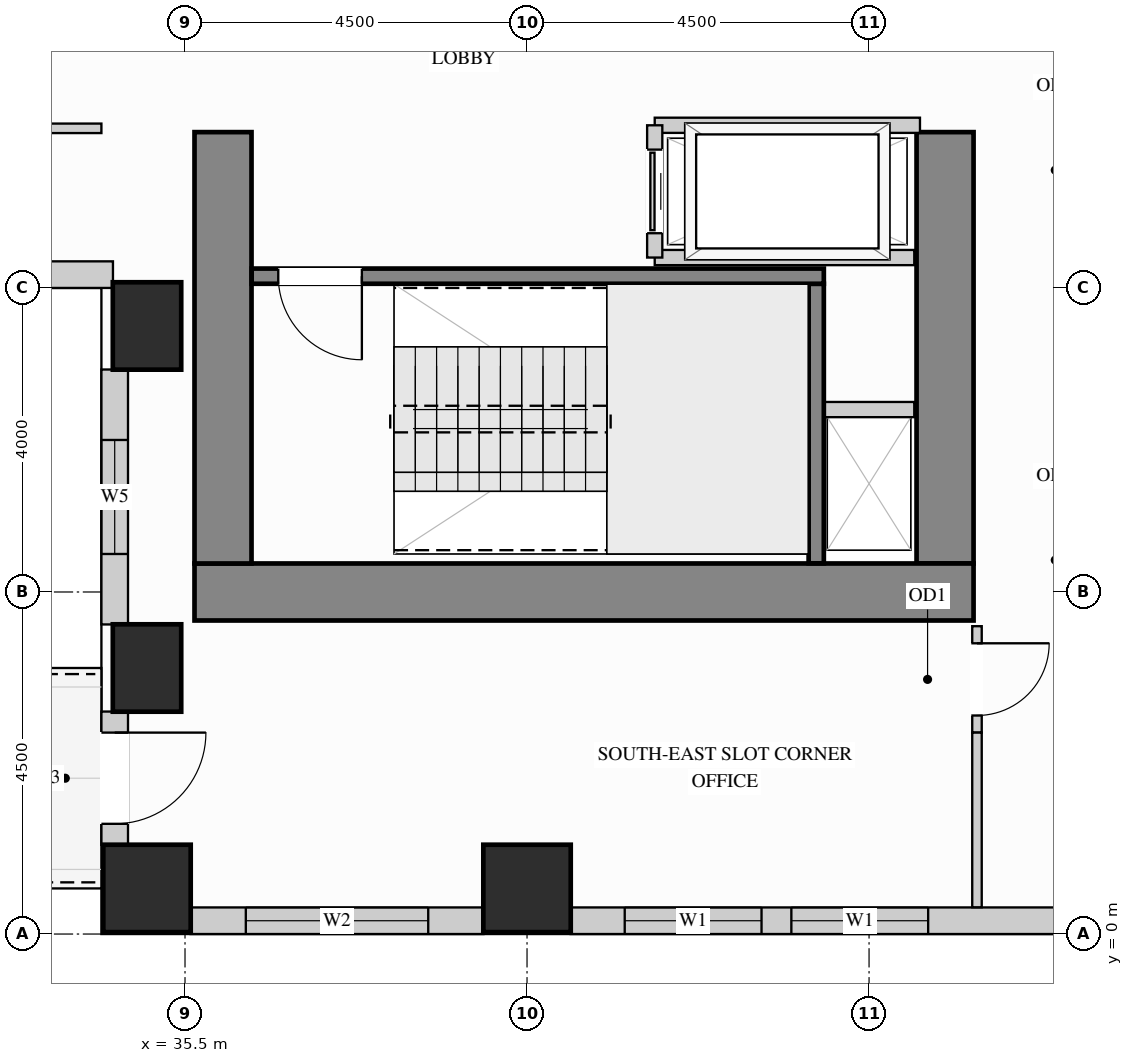
"""IFC4 building model, lengths in metres.
Left out: names, types, materials, properties, quantities, classifications, styles, units other than length and angle.
Written with IfcOpenShell. Run it as: python <this file> out.ifc"""

import sys

from ifc_helpers import new_model, si_unit, direction, frame, frame_2d, origin, origin_2d, place, context, subcontext, project, spatial, rectangle, extrude, source, transform, mapped, element, fill, save


model = new_model("IFC4")
c1 = context("Model", 3, precision=1e-05, world=origin(), true_north=direction((0.0, 1.0)))
c2 = subcontext(c1, "Body", "Model", "MODEL_VIEW")
j1 = project(units=[si_unit("LENGTHUNIT", "METRE"), si_unit("PLANEANGLEUNIT", "RADIAN")], contexts=[c1])
p1 = place(None, origin())
s1 = spatial("IfcSite", under=j1, at=p1, CompositionType="ELEMENT")
p2 = place(p1, origin())
s2 = spatial("IfcBuilding", under=s1, at=p2, CompositionType="ELEMENT")
p3 = place(p2, frame((0.0, 0.0, 135.0)))
s3 = spatial("IfcBuildingStorey", under=s2, at=p3, CompositionType="ELEMENT", Elevation=135.0)
m1 = source(origin(), c2, "Body", "SweptSolid", [
    extrude(rectangle(XDim=0.9, YDim=1.15, at=origin_2d()), origin(), (0.0, 0.0, 1.0), 3.32),
])
for number, where, z_axis, x_axis in (
    (1, (35.0, 3.5, 0.0), (0.0, 0.0, 1.0), (1.0, 0.0, 0.0)),
    (2, (35.0, 8.0, 0.0), (0.0, 0.0, 1.0), (1.0, 0.0, 0.0)),
):
    element("IfcColumn", number, at=place(p3, frame(where, z_axis=z_axis, x_axis=x_axis)), inside=s3, PredefinedType="COLUMN", context=c2, shape_type="MappedRepresentation", body=[
        mapped(m1, transform((0.0, 0.0, 0.0), x_axis=(1.0, 0.0, 0.0), y_axis=(0.0, 1.0, 0.0), z_axis=(0.0, 0.0, 1.0))),
    ])
m2 = source(origin(), c2, "Body", "SweptSolid", [
    extrude(rectangle(XDim=1.15, YDim=1.15, at=origin_2d()), origin(), (0.0, 0.0, 1.0), 3.32),
])
for number, where, z_axis, x_axis in (
    (3, (35.0, 0.6, 0.0), (0.0, 0.0, 1.0), (1.0, 0.0, 0.0)),
    (4, (40.0, 0.6, 0.0), (0.0, 0.0, 1.0), (1.0, 0.0, 0.0)),
):
    element("IfcColumn", number, at=place(p3, frame(where, z_axis=z_axis, x_axis=x_axis)), inside=s3, PredefinedType="COLUMN", context=c2, shape_type="MappedRepresentation", body=[
        mapped(m2, transform((0.0, 0.0, 0.0), x_axis=(1.0, 0.0, 0.0), y_axis=(0.0, 1.0, 0.0), z_axis=(0.0, 0.0, 1.0))),
    ])
m3 = source(origin(), c2, "Body", "SweptSolid", [
    extrude(rectangle(XDim=5.675, YDim=0.75, at=frame_2d((2.837, 0.0))), origin(), (0.0, 0.0, 1.0), 3.32),
])
p4 = place(p3, frame((45.5, 4.875, 0.0), z_axis=(0.0, 0.0, 1.0), x_axis=(0.0, 1.0, 0.0)))
e5 = element("IfcWall", 5, at=p4, inside=s3, PredefinedType="SHEAR", context=c2, shape_type="MappedRepresentation", body=[
    mapped(m3, transform((0.0, 0.0, 0.0), x_axis=(1.0, 0.0, 0.0), y_axis=(0.0, 1.0, 0.0), z_axis=(0.0, 0.0, 1.0))),
])
m4 = source(origin(), c2, "Body", "SweptSolid", [
    extrude(rectangle(XDim=10.25, YDim=0.75, at=frame_2d((5.125, 0.0))), origin(), (0.0, 0.0, 1.0), 3.32),
])
p5 = place(p3, frame((35.625, 4.5, 0.0), z_axis=(0.0, 0.0, 1.0), x_axis=(1.0, 0.0, 0.0)))
e6 = element("IfcWall", 6, at=p5, inside=s3, PredefinedType="SHEAR", context=c2, shape_type="MappedRepresentation", body=[
    mapped(m4, transform((0.0, 0.0, 0.0), x_axis=(1.0, 0.0, 0.0), y_axis=(0.0, 1.0, 0.0), z_axis=(0.0, 0.0, 1.0))),
])
p6 = place(p3, frame((36.0, 4.875, 0.0), z_axis=(0.0, 0.0, 1.0), x_axis=(0.0, 1.0, 0.0)))
e7 = element("IfcWall", 7, at=p6, inside=s3, PredefinedType="SHEAR", context=c2, shape_type="MappedRepresentation", body=[
    mapped(m3, transform((0.0, 0.0, 0.0), x_axis=(1.0, 0.0, 0.0), y_axis=(0.0, 1.0, 0.0), z_axis=(0.0, 0.0, 1.0))),
])
p7 = place(p3, frame((30.948, 8.675, 0.0), z_axis=(0.0, 0.0, 1.0), x_axis=(1.0, 0.0, 0.0)))
e8 = element("IfcWall", 8, at=p7, inside=s3, PredefinedType="SOLIDWALL", context=c2, shape_type="SweptSolid", body=[
    extrude(rectangle(XDim=3.604, YDim=0.35, at=frame_2d((1.802, 0.0))), origin(), (0.0, 0.0, 1.0), 3.305),
])
p8 = place(p7, frame((1.052, 0.0, 0.78)))
e9 = element("IfcOpeningElement", 9, at=p8, cuts=e8, PredefinedType="OPENING", context=c2, shape_type="SweptSolid", body=[
    extrude(rectangle(XDim=1.5, YDim=2.0, at=frame_2d((0.75, 1.0))), frame((0.0, 0.185, 0.0), z_axis=(0.0, -1.0, 0.0), x_axis=(1.0, 0.0, 0.0)), (0.0, 0.0, 1.0), 0.37),
])
p9 = place(p3, frame((34.575, 7.427, 0.0), z_axis=(0.0, 0.0, 1.0), x_axis=(0.0, -1.0, 0.0)))
e10 = element("IfcWall", 10, at=p9, inside=s3, PredefinedType="SOLIDWALL", context=c2, shape_type="SweptSolid", body=[
    extrude(rectangle(XDim=3.354, YDim=0.35, at=frame_2d((1.677, 0.0))), origin(), (0.0, 0.0, 1.0), 3.305),
])
p10 = place(p9, frame((0.927, 0.0, 0.78)))
e11 = element("IfcOpeningElement", 11, at=p10, cuts=e10, PredefinedType="OPENING", context=c2, shape_type="SweptSolid", body=[
    extrude(rectangle(XDim=1.5, YDim=2.0, at=frame_2d((0.75, 1.0))), frame((0.0, 0.185, 0.0), z_axis=(0.0, -1.0, 0.0), x_axis=(1.0, 0.0, 0.0)), (0.0, 0.0, 1.0), 0.37),
])
p11 = place(p3, frame((34.575, 2.927, 0.0), z_axis=(0.0, 0.0, 1.0), x_axis=(0.0, -1.0, 0.0)))
e12 = element("IfcWall", 12, at=p11, inside=s3, PredefinedType="SOLIDWALL", context=c2, shape_type="SweptSolid", body=[
    extrude(rectangle(XDim=1.754, YDim=0.35, at=frame_2d((0.877, 0.0))), origin(), (0.0, 0.0, 1.0), 3.305),
])
p12 = place(p11, frame((0.277, 0.0, 0.0)))
e13 = element("IfcOpeningElement", 13, at=p12, cuts=e12, PredefinedType="OPENING", context=c2, shape_type="SweptSolid", body=[
    extrude(rectangle(XDim=1.2, YDim=2.15, at=frame_2d((0.6, 1.075))), frame((0.0, 0.185, 0.0), z_axis=(0.0, -1.0, 0.0), x_axis=(1.0, 0.0, 0.0)), (0.0, 0.0, 1.0), 0.37),
])
p13 = place(p3, frame((35.573, 0.175, 0.0), z_axis=(0.0, 0.0, 1.0), x_axis=(1.0, 0.0, 0.0)))
e14 = element("IfcWall", 14, at=p13, inside=s3, PredefinedType="SOLIDWALL", context=c2, shape_type="SweptSolid", body=[
    extrude(rectangle(XDim=3.854, YDim=0.35, at=frame_2d((1.927, 0.0))), origin(), (0.0, 0.0, 1.0), 3.305),
])
p14 = place(p13, frame((0.727, 0.0, 0.78)))
e15 = element("IfcOpeningElement", 15, at=p14, cuts=e14, PredefinedType="OPENING", context=c2, shape_type="SweptSolid", body=[
    extrude(rectangle(XDim=2.4, YDim=2.1, at=frame_2d((1.2, 1.05))), frame((0.0, 0.185, 0.0), z_axis=(0.0, -1.0, 0.0), x_axis=(1.0, 0.0, 0.0)), (0.0, 0.0, 1.0), 0.37),
])
p15 = place(p3, frame((40.573, 0.175, 0.0), z_axis=(0.0, 0.0, 1.0), x_axis=(1.0, 0.0, 0.0)))
e16 = element("IfcWall", 16, at=p15, inside=s3, PredefinedType="SOLIDWALL", context=c2, shape_type="SweptSolid", body=[
    extrude(rectangle(XDim=6.454, YDim=0.35, at=frame_2d((3.227, 0.0))), origin(), (0.0, 0.0, 1.0), 3.305),
])
p16 = place(p15, frame((0.712, 0.0, 0.78)))
e17 = element("IfcOpeningElement", 17, at=p16, cuts=e16, PredefinedType="OPENING", context=c2, shape_type="SweptSolid", body=[
    extrude(rectangle(XDim=1.8, YDim=2.1, at=frame_2d((0.9, 1.05))), frame((0.0, 0.185, 0.0), z_axis=(0.0, -1.0, 0.0), x_axis=(1.0, 0.0, 0.0)), (0.0, 0.0, 1.0), 0.37),
])
p17 = place(p15, frame((2.905, 0.0, 0.78)))
e18 = element("IfcOpeningElement", 18, at=p17, cuts=e16, PredefinedType="OPENING", context=c2, shape_type="SweptSolid", body=[
    extrude(rectangle(XDim=1.8, YDim=2.1, at=frame_2d((0.9, 1.05))), frame((0.0, 0.185, 0.0), z_axis=(0.0, -1.0, 0.0), x_axis=(1.0, 0.0, 0.0)), (0.0, 0.0, 1.0), 0.37),
])
p18 = place(p3, frame((45.92, 2.65, 0.0), z_axis=(0.0, 0.0, 1.0), x_axis=(0.0, 1.0, 0.0)))
e19 = element("IfcWall", 19, at=p18, inside=s3, PredefinedType="PARTITIONING", context=c2, shape_type="SweptSolid", body=[
    extrude(rectangle(XDim=1.4, YDim=0.125, at=frame_2d((0.7, 0.0))), origin(), (0.0, 0.0, 1.0), 3.305),
])
p19 = place(p18, frame((0.225, 0.0, 0.0)))
e20 = element("IfcOpeningElement", 20, at=p19, cuts=e19, PredefinedType="OPENING", context=c2, shape_type="SweptSolid", body=[
    extrude(rectangle(XDim=0.95, YDim=2.15, at=frame_2d((0.475, 1.075))), frame((0.0, 0.073, 0.0), z_axis=(0.0, -1.0, 0.0), x_axis=(1.0, 0.0, 0.0)), (0.0, 0.0, 1.0), 0.145),
])
m5 = source(origin(), c2, "Body", "SweptSolid", [
    extrude(rectangle(XDim=2.298, YDim=0.125, at=frame_2d((1.149, 0.0))), origin(), (0.0, 0.0, 1.0), 3.305),
])
p20 = place(p3, frame((45.92, 0.352, 0.0), z_axis=(0.0, 0.0, 1.0), x_axis=(0.0, 1.0, 0.0)))
e21 = element("IfcWall", 21, at=p20, inside=s3, PredefinedType="PARTITIONING", context=c2, shape_type="MappedRepresentation", body=[
    mapped(m5, transform((0.0, 0.0, 0.0), x_axis=(1.0, 0.0, 0.0), y_axis=(0.0, 1.0, 0.0), z_axis=(0.0, 0.0, 1.0))),
])
p21 = place(p3, frame((29.85, 10.6, 0.0), z_axis=(0.0, 0.0, 1.0), x_axis=(1.0, 0.0, 0.0)))
e22 = element("IfcWall", 22, at=p21, inside=s3, PredefinedType="PARTITIONING", context=c2, shape_type="SweptSolid", body=[
    extrude(rectangle(XDim=4.55, YDim=0.125, at=frame_2d((2.275, 0.0))), origin(), (0.0, 0.0, 1.0), 3.305),
])
p22 = place(p21, frame((1.8, 0.0, 0.0)))
e23 = element("IfcOpeningElement", 23, at=p22, cuts=e22, PredefinedType="OPENING", context=c2, shape_type="SweptSolid", body=[
    extrude(rectangle(XDim=0.95, YDim=2.15, at=frame_2d((0.475, 1.075))), frame((0.0, 0.073, 0.0), z_axis=(0.0, -1.0, 0.0), x_axis=(1.0, 0.0, 0.0)), (0.0, 0.0, 1.0), 0.145),
])
m6 = source(origin(), c2, "Body", "SweptSolid", [
    extrude(rectangle(XDim=1.245, YDim=0.2, at=frame_2d((0.623, 0.0))), origin(), (0.0, 0.0, 1.0), 3.305),
])
p23 = place(p3, frame((43.85, 6.9, 0.0), z_axis=(0.0, 0.0, 1.0), x_axis=(1.0, 0.0, 0.0)))
e24 = element("IfcWall", 24, at=p23, inside=s3, PredefinedType="PARTITIONING", context=c2, shape_type="MappedRepresentation", body=[
    mapped(m6, transform((0.0, 0.0, 0.0), x_axis=(1.0, 0.0, 0.0), y_axis=(0.0, 1.0, 0.0), z_axis=(0.0, 0.0, 1.0))),
])
m7 = source(origin(), c2, "Body", "SweptSolid", [
    extrude(rectangle(XDim=3.49, YDim=0.2, at=frame_2d((1.745, 0.0))), origin(), (0.0, 0.0, 1.0), 3.305),
])
p24 = place(p3, frame((41.68, 10.64, 0.0), z_axis=(0.0, 0.0, 1.0), x_axis=(1.0, 0.0, 0.0)))
e25 = element("IfcWall", 25, at=p24, inside=s3, PredefinedType="PARTITIONING", context=c2, shape_type="MappedRepresentation", body=[
    mapped(m7, transform((0.0, 0.0, 0.0), x_axis=(1.0, 0.0, 0.0), y_axis=(0.0, 1.0, 0.0), z_axis=(0.0, 0.0, 1.0))),
])
m8 = source(origin(), c2, "Body", "SweptSolid", [
    extrude(rectangle(XDim=3.415, YDim=0.2, at=frame_2d((1.708, 0.0))), origin(), (0.0, 0.0, 1.0), 3.305),
])
p25 = place(p3, frame((41.68, 8.9, 0.0), z_axis=(0.0, 0.0, 1.0), x_axis=(1.0, 0.0, 0.0)))
e26 = element("IfcWall", 26, at=p25, inside=s3, PredefinedType="PARTITIONING", context=c2, shape_type="MappedRepresentation", body=[
    mapped(m8, transform((0.0, 0.0, 0.0), x_axis=(1.0, 0.0, 0.0), y_axis=(0.0, 1.0, 0.0), z_axis=(0.0, 0.0, 1.0))),
])
p26 = place(p3, frame((41.68, 8.9, 0.0), z_axis=(0.0, 0.0, 1.0), x_axis=(0.0, 1.0, 0.0)))
e27 = element("IfcWall", 27, at=p26, inside=s3, PredefinedType="PARTITIONING", context=c2, shape_type="SweptSolid", body=[
    extrude(rectangle(XDim=1.74, YDim=0.2, at=frame_2d((0.87, 0.0))), origin(), (0.0, 0.0, 1.0), 3.305),
])
p27 = place(p26, frame((0.32, 0.0, 0.0)))
e28 = element("IfcOpeningElement", 28, at=p27, cuts=e27, PredefinedType="OPENING", context=c2, shape_type="SweptSolid", body=[
    extrude(rectangle(XDim=1.1, YDim=2.2, at=frame_2d((0.55, 1.1))), frame((0.0, 0.11, 0.0), z_axis=(0.0, -1.0, 0.0), x_axis=(1.0, 0.0, 0.0)), (0.0, 0.0, 1.0), 0.22),
])
m9 = source(origin(), c2, "Body", "SweptSolid", [
    extrude(rectangle(XDim=3.678, YDim=0.2, at=frame_2d((1.839, 0.0))), origin(), (0.0, 0.0, 1.0), 3.32),
])
p28 = place(p3, frame((43.805, 4.877, 0.0), z_axis=(0.0, 0.0, 1.0), x_axis=(0.0, 1.0, 0.0)))
e29 = element("IfcWall", 29, at=p28, inside=s3, PredefinedType="SHEAR", context=c2, shape_type="MappedRepresentation", body=[
    mapped(m9, transform((0.0, 0.0, 0.0), x_axis=(1.0, 0.0, 0.0), y_axis=(0.0, 1.0, 0.0), z_axis=(0.0, 0.0, 1.0))),
])
p29 = place(p3, frame((36.377, 8.655, 0.0), z_axis=(0.0, 0.0, 1.0), x_axis=(1.0, 0.0, 0.0)))
e30 = element("IfcWall", 30, at=p29, inside=s3, PredefinedType="SHEAR", context=c2, shape_type="SweptSolid", body=[
    extrude(rectangle(XDim=7.528, YDim=0.2, at=frame_2d((3.764, 0.0))), origin(), (0.0, 0.0, 1.0), 3.32),
])
p30 = place(p29, frame((0.35, 0.0, 0.0)))
e31 = element("IfcOpeningElement", 31, at=p30, cuts=e30, PredefinedType="OPENING", context=c2, shape_type="SweptSolid", body=[
    extrude(rectangle(XDim=1.1, YDim=2.15, at=frame_2d((0.55, 1.075))), frame((0.0, 0.11, 0.0), z_axis=(0.0, -1.0, 0.0), x_axis=(1.0, 0.0, 0.0)), (0.0, 0.0, 1.0), 0.22),
])
m10 = source(origin(), c2, "Body", "SweptSolid", [
    extrude(rectangle(XDim=1.2, YDim=2.15, at=frame_2d((0.6, 1.075))), frame((0.0, 0.025, 0.0), z_axis=(0.0, -1.0, 0.0), x_axis=(1.0, 0.0, 0.0)), (0.0, 0.0, 1.0), 0.05),
])
p31 = place(p12, frame((1.2, 0.0, 0.0), z_axis=(0.0, 0.0, 1.0), x_axis=(-1.0, 0.0, 0.0)))
e32 = element("IfcDoor", 32, at=p31, inside=s3, OperationType="SINGLE_SWING_LEFT", PredefinedType="DOOR", context=c2, shape_type="MappedRepresentation", body=[
    mapped(m10, transform((0.0, 0.0, 0.0), x_axis=(1.0, 0.0, 0.0), y_axis=(0.0, 1.0, 0.0), z_axis=(0.0, 0.0, 1.0))),
])
fill(e13, e32)
m11 = source(origin(), c2, "Body", "SweptSolid", [
    extrude(rectangle(XDim=1.1, YDim=2.2, at=frame_2d((0.55, 1.1))), frame((0.0, 0.025, 0.0), z_axis=(0.0, -1.0, 0.0), x_axis=(1.0, 0.0, 0.0)), (0.0, 0.0, 1.0), 0.05),
])
p32 = place(p27, origin())
e33 = element("IfcDoor", 33, at=p32, inside=s3, OperationType="SLIDING_TO_LEFT", PredefinedType="DOOR", context=c2, shape_type="MappedRepresentation", body=[
    mapped(m11, transform((0.0, 0.0, 0.0), x_axis=(1.0, 0.0, 0.0), y_axis=(0.0, 1.0, 0.0), z_axis=(0.0, 0.0, 1.0))),
])
fill(e28, e33)
m12 = source(origin(), c2, "Body", "SweptSolid", [
    extrude(rectangle(XDim=0.95, YDim=2.15, at=frame_2d((0.475, 1.075))), frame((0.0, 0.025, 0.0), z_axis=(0.0, -1.0, 0.0), x_axis=(1.0, 0.0, 0.0)), (0.0, 0.0, 1.0), 0.05),
])
p33 = place(p19, origin())
e34 = element("IfcDoor", 34, at=p33, inside=s3, OperationType="SINGLE_SWING_RIGHT", PredefinedType="DOOR", context=c2, shape_type="MappedRepresentation", body=[
    mapped(m12, transform((0.0, 0.0, 0.0), x_axis=(1.0, 0.0, 0.0), y_axis=(0.0, 1.0, 0.0), z_axis=(0.0, 0.0, 1.0))),
])
fill(e20, e34)
m13 = source(origin(), c2, "Body", "SweptSolid", [
    extrude(rectangle(XDim=1.1, YDim=2.15, at=frame_2d((0.55, 1.075))), frame((0.0, 0.025, 0.0), z_axis=(0.0, -1.0, 0.0), x_axis=(1.0, 0.0, 0.0)), (0.0, 0.0, 1.0), 0.05),
])
p34 = place(p30, origin())
e35 = element("IfcDoor", 35, at=p34, inside=s3, OperationType="SINGLE_SWING_RIGHT", PredefinedType="DOOR", context=c2, shape_type="MappedRepresentation", body=[
    mapped(m13, transform((0.0, 0.0, 0.0), x_axis=(1.0, 0.0, 0.0), y_axis=(0.0, 1.0, 0.0), z_axis=(0.0, 0.0, 1.0))),
])
fill(e31, e35)
m14 = source(origin(), c2, "Body", "SweptSolid", [
    extrude(rectangle(XDim=1.8, YDim=2.1, at=frame_2d((0.9, 1.05))), frame((0.0, 0.03, 0.0), z_axis=(0.0, -1.0, 0.0), x_axis=(1.0, 0.0, 0.0)), (0.0, 0.0, 1.0), 0.06),
])
p35 = place(p16, origin())
e36 = element("IfcWindow", 36, at=p35, inside=s3, PartitioningType="SINGLE_PANEL", PredefinedType="WINDOW", context=c2, shape_type="MappedRepresentation", body=[
    mapped(m14, transform((0.0, 0.0, 0.0), x_axis=(1.0, 0.0, 0.0), y_axis=(0.0, 1.0, 0.0), z_axis=(0.0, 0.0, 1.0))),
])
fill(e17, e36)
p36 = place(p17, origin())
e37 = element("IfcWindow", 37, at=p36, inside=s3, PartitioningType="SINGLE_PANEL", PredefinedType="WINDOW", context=c2, shape_type="MappedRepresentation", body=[
    mapped(m14, transform((0.0, 0.0, 0.0), x_axis=(1.0, 0.0, 0.0), y_axis=(0.0, 1.0, 0.0), z_axis=(0.0, 0.0, 1.0))),
])
fill(e18, e37)
m15 = source(origin(), c2, "Body", "SweptSolid", [
    extrude(rectangle(XDim=2.4, YDim=2.1, at=frame_2d((1.2, 1.05))), frame((0.0, 0.03, 0.0), z_axis=(0.0, -1.0, 0.0), x_axis=(1.0, 0.0, 0.0)), (0.0, 0.0, 1.0), 0.06),
])
p37 = place(p14, origin())
e38 = element("IfcWindow", 38, at=p37, inside=s3, PartitioningType="SINGLE_PANEL", PredefinedType="WINDOW", context=c2, shape_type="MappedRepresentation", body=[
    mapped(m15, transform((0.0, 0.0, 0.0), x_axis=(1.0, 0.0, 0.0), y_axis=(0.0, 1.0, 0.0), z_axis=(0.0, 0.0, 1.0))),
])
fill(e15, e38)
m16 = source(origin(), c2, "Body", "SweptSolid", [
    extrude(rectangle(XDim=1.5, YDim=2.0, at=frame_2d((0.75, 1.0))), frame((0.0, 0.03, 0.0), z_axis=(0.0, -1.0, 0.0), x_axis=(1.0, 0.0, 0.0)), (0.0, 0.0, 1.0), 0.06),
])
p38 = place(p10, origin())
e39 = element("IfcWindow", 39, at=p38, inside=s3, PartitioningType="SINGLE_PANEL", PredefinedType="WINDOW", context=c2, shape_type="MappedRepresentation", body=[
    mapped(m16, transform((0.0, 0.0, 0.0), x_axis=(1.0, 0.0, 0.0), y_axis=(0.0, 1.0, 0.0), z_axis=(0.0, 0.0, 1.0))),
])
fill(e11, e39)
save(model, sys.argv[1])
